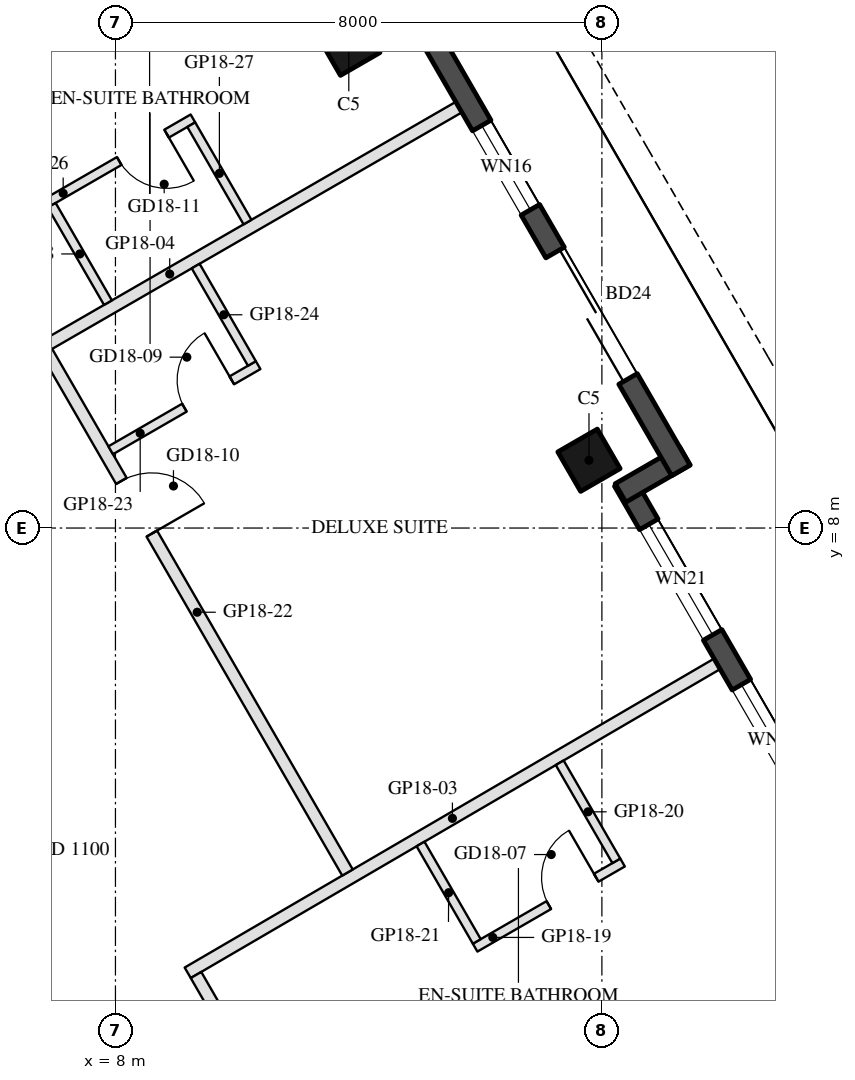
"""IFC4 building model, lengths in metres.
Left out: names, types, materials, properties, quantities, classifications, styles, units other than length and angle.
Written with IfcOpenShell. Run it as: python <this file> out.ifc"""

import sys

from ifc_helpers import new_model, si_unit, direction, frame, frame_2d, origin, origin_2d, place, context, subcontext, project, spatial, rectangle, hollow_rectangle, extrude, element, fill, save


model = new_model("IFC4")
c1 = context("Model", 3, precision=1e-05, world=origin(), true_north=direction((0.0, 1.0)))
c2 = subcontext(c1, "Body", "Model", "MODEL_VIEW")
j1 = project(units=[si_unit("LENGTHUNIT", "METRE"), si_unit("PLANEANGLEUNIT", "RADIAN")], contexts=[c1])
p1 = place(None, origin())
s1 = spatial("IfcSite", under=j1, at=p1, CompositionType="ELEMENT")
p2 = place(p1, origin())
s2 = spatial("IfcBuilding", under=s1, at=p2, CompositionType="ELEMENT")
p3 = place(p2, frame((0.0, 0.0, 191.0)))
s3 = spatial("IfcBuildingStorey", under=s2, at=p3, CompositionType="ELEMENT", Elevation=191.0)
for number, where, z_axis, x_axis in (
    (1, (15.788, 9.115, 0.0), (0.0, 0.0, 1.0), (-0.5, 0.866, 0.0)),
    (2, (11.838, 15.957, 0.0), (0.0, 0.0, 1.0), (-0.5, 0.866, 0.0)),
):
    element("IfcColumn", number, at=place(p3, frame(where, z_axis=z_axis, x_axis=x_axis)), inside=s3, PredefinedType="COLUMN", context=c2, shape_type="SweptSolid", body=[
        extrude(hollow_rectangle(XDim=0.75, YDim=0.75, WallThickness=0.035, at=origin_2d()), origin(), (0.0, 0.0, 1.0), 3.7),
    ])
p4 = place(p3, frame((19.729, 2.938, 0.0), z_axis=(0.0, 0.0, 1.0), x_axis=(-0.499976430342, 0.866039011305, 0.0)))
e3 = element("IfcWall", 3, at=p4, inside=s3, PredefinedType="SOLIDWALL", context=c2, shape_type="SweptSolid", body=[
    extrude(rectangle(XDim=6.74, YDim=0.35, at=frame_2d((3.37, 0.0))), origin(), (0.0, 0.0, 1.0), 3.55),
])
p5 = place(p4, frame((0.77, 0.0, 0.3)))
e4 = element("IfcOpeningElement", 4, at=p5, cuts=e3, PredefinedType="OPENING", context=c2, shape_type="SweptSolid", body=[
    extrude(rectangle(XDim=2.1, YDim=2.65, at=frame_2d((1.05, 1.325))), frame((0.0, 0.185, 0.0), z_axis=(0.0, -1.0, 0.0), x_axis=(1.0, 0.0, 0.0)), (0.0, 0.0, 1.0), 0.37),
])
p6 = place(p4, frame((3.815, 0.0, 0.3)))
e5 = element("IfcOpeningElement", 5, at=p6, cuts=e3, PredefinedType="OPENING", context=c2, shape_type="SweptSolid", body=[
    extrude(rectangle(XDim=2.1, YDim=2.65, at=frame_2d((1.05, 1.325))), frame((0.0, 0.185, 0.0), z_axis=(0.0, -1.0, 0.0), x_axis=(1.0, 0.0, 0.0)), (0.0, 0.0, 1.0), 0.37),
])
p7 = place(p3, frame((16.306, 8.577, 0.0), z_axis=(0.0, 0.0, 1.0), x_axis=(0.866092288191, 0.499884134912, 0.0)))
e6 = element("IfcWall", 6, at=p7, inside=s3, PredefinedType="SOLIDWALL", context=c2, shape_type="SweptSolid", body=[
    extrude(rectangle(XDim=1.22, YDim=0.35, at=frame_2d((0.61, 0.0))), origin(), (0.0, 0.0, 1.0), 3.55),
])
p8 = place(p3, frame((17.299, 8.948, 0.0), z_axis=(0.0, 0.0, 1.0), x_axis=(-0.500010041276, 0.866019606374, 0.0)))
e7 = element("IfcWall", 7, at=p8, inside=s3, PredefinedType="SOLIDWALL", context=c2, shape_type="SweptSolid", body=[
    extrude(rectangle(XDim=9.7, YDim=0.35, at=frame_2d((4.85, 0.0))), origin(), (0.0, 0.0, 1.0), 3.55),
])
p9 = place(p8, frame((1.737, 0.0, 0.0)))
e8 = element("IfcOpeningElement", 8, at=p9, cuts=e7, PredefinedType="OPENING", context=c2, shape_type="SweptSolid", body=[
    extrude(rectangle(XDim=2.4, YDim=2.4, at=frame_2d((1.2, 1.2))), frame((0.0, 0.185, 0.0), z_axis=(0.0, -1.0, 0.0), x_axis=(1.0, 0.0, 0.0)), (0.0, 0.0, 1.0), 0.37),
])
p10 = place(p8, frame((4.949, 0.0, 0.3)))
e9 = element("IfcOpeningElement", 9, at=p10, cuts=e7, PredefinedType="OPENING", context=c2, shape_type="SweptSolid", body=[
    extrude(rectangle(XDim=1.6, YDim=2.65, at=frame_2d((0.8, 1.325))), frame((0.0, 0.185, 0.0), z_axis=(0.0, -1.0, 0.0), x_axis=(1.0, 0.0, 0.0)), (0.0, 0.0, 1.0), 0.37),
])
p11 = place(p3, frame((17.895, 5.766, 0.0), z_axis=(0.0, 0.0, 1.0), x_axis=(-0.863697195261, -0.504011066246, 0.0)))
e10 = element("IfcWall", 10, at=p11, inside=s3, PredefinedType="PARTITIONING", context=c2, shape_type="SweptSolid", body=[
    extrude(rectangle(XDim=10.08, YDim=0.2, at=frame_2d((5.04, 0.0))), origin(), (0.0, 0.0, 1.0), 2.95),
])
p12 = place(p3, frame((13.647, 14.923, 0.0), z_axis=(0.0, 0.0, 1.0), x_axis=(-0.866027479907, -0.499996404033, 0.0)))
e11 = element("IfcWall", 11, at=p12, inside=s3, PredefinedType="PARTITIONING", context=c2, shape_type="SweptSolid", body=[
    extrude(rectangle(XDim=10.98, YDim=0.2, at=frame_2d((5.49, 0.0))), origin(), (0.0, 0.0, 1.0), 3.06),
])
p13 = place(p3, frame((9.325, 0.649, 0.0), z_axis=(0.0, 0.0, 1.0), x_axis=(0.500032331163, -0.866006736574, 0.0)))
e12 = element("IfcWall", 12, at=p13, inside=s3, PredefinedType="PARTITIONING", context=c2, shape_type="SweptSolid", body=[
    extrude(rectangle(XDim=5.888, YDim=0.2, at=frame_2d((2.944, 0.0))), origin(), (0.0, 0.0, 1.0), 2.95),
])
p14 = place(p13, frame((2.444, 0.0, 0.0)))
e13 = element("IfcOpeningElement", 13, at=p14, cuts=e12, PredefinedType="OPENING", context=c2, shape_type="SweptSolid", body=[
    extrude(rectangle(XDim=1.0, YDim=2.1, at=frame_2d((0.5, 1.05))), frame((0.0, 0.11, 0.0), z_axis=(0.0, -1.0, 0.0), x_axis=(1.0, 0.0, 0.0)), (0.0, 0.0, 1.0), 0.22),
])
p15 = place(p3, frame((13.915, 1.099, 0.0), z_axis=(0.0, 0.0, 1.0), x_axis=(0.866018616679, 0.500011755427, 0.0)))
e14 = element("IfcWall", 14, at=p15, inside=s3, PredefinedType="PARTITIONING", context=c2, shape_type="SweptSolid", body=[
    extrude(rectangle(XDim=2.8, YDim=0.15, at=frame_2d((1.4, 0.0))), origin(), (0.0, 0.0, 1.0), 3.55),
])
p16 = place(p15, frame((1.4, 0.0, 0.0)))
e15 = element("IfcOpeningElement", 15, at=p16, cuts=e14, PredefinedType="OPENING", context=c2, shape_type="SweptSolid", body=[
    extrude(rectangle(XDim=0.9, YDim=2.1, at=frame_2d((0.45, 1.05))), frame((0.0, 0.085, 0.0), z_axis=(0.0, -1.0, 0.0), x_axis=(1.0, 0.0, 0.0)), (0.0, 0.0, 1.0), 0.17),
])
p17 = place(p3, frame((16.237, 2.526, 0.0), z_axis=(0.0, 0.0, 1.0), x_axis=(-0.500043919151, 0.866000045566, 0.0)))
e16 = element("IfcWall", 16, at=p17, inside=s3, PredefinedType="PARTITIONING", context=c2, shape_type="SweptSolid", body=[
    extrude(rectangle(XDim=1.863, YDim=0.15, at=frame_2d((0.931, 0.0))), origin(), (0.0, 0.0, 1.0), 3.55),
])
p18 = place(p3, frame((13.942, 1.201, 0.0), z_axis=(0.0, 0.0, 1.0), x_axis=(-0.500026996568, 0.866009816748, 0.0)))
e17 = element("IfcWall", 17, at=p18, inside=s3, PredefinedType="PARTITIONING", context=c2, shape_type="SweptSolid", body=[
    extrude(rectangle(XDim=1.851, YDim=0.15, at=frame_2d((0.925, 0.0))), origin(), (0.0, 0.0, 1.0), 3.55),
])
p19 = place(p3, frame((6.873, 10.896, 0.0), z_axis=(0.0, 0.0, 1.0), x_axis=(0.499987518031, -0.866032610133, 0.0)))
e18 = element("IfcWall", 18, at=p19, inside=s3, PredefinedType="PARTITIONING", context=c2, shape_type="SweptSolid", body=[
    extrude(rectangle(XDim=9.886, YDim=0.2, at=frame_2d((4.943, 0.0))), origin(), (0.0, 0.0, 1.0), 2.95),
])
p20 = place(p19, frame((2.45, 0.0, 0.0)))
e19 = element("IfcOpeningElement", 19, at=p20, cuts=e18, PredefinedType="OPENING", context=c2, shape_type="SweptSolid", body=[
    extrude(rectangle(XDim=1.0, YDim=2.1, at=frame_2d((0.5, 1.05))), frame((0.0, 0.11, 0.0), z_axis=(0.0, -1.0, 0.0), x_axis=(1.0, 0.0, 0.0)), (0.0, 0.0, 1.0), 0.22),
])
p21 = place(p3, frame((7.922, 9.279, 0.0), z_axis=(0.0, 0.0, 1.0), x_axis=(0.865996816683, 0.500049511043, 0.0)))
e20 = element("IfcWall", 20, at=p21, inside=s3, PredefinedType="PARTITIONING", context=c2, shape_type="SweptSolid", body=[
    extrude(rectangle(XDim=2.8, YDim=0.15, at=frame_2d((1.4, 0.0))), origin(), (0.0, 0.0, 1.0), 2.95),
])
p22 = place(p21, frame((1.4, 0.0, 0.0)))
e21 = element("IfcOpeningElement", 21, at=p22, cuts=e20, PredefinedType="OPENING", context=c2, shape_type="SweptSolid", body=[
    extrude(rectangle(XDim=0.9, YDim=2.1, at=frame_2d((0.45, 1.05))), frame((0.0, 0.085, 0.0), z_axis=(0.0, -1.0, 0.0), x_axis=(1.0, 0.0, 0.0)), (0.0, 0.0, 1.0), 0.17),
])
p23 = place(p3, frame((10.244, 10.707, 0.0), z_axis=(0.0, 0.0, 1.0), x_axis=(-0.500042316284, 0.866000971088, 0.0)))
e22 = element("IfcWall", 22, at=p23, inside=s3, PredefinedType="PARTITIONING", context=c2, shape_type="SweptSolid", body=[
    extrude(rectangle(XDim=1.85, YDim=0.15, at=frame_2d((0.925, 0.0))), origin(), (0.0, 0.0, 1.0), 3.55),
])
p24 = place(p3, frame((9.274, 14.737, 0.0), z_axis=(0.0, 0.0, 1.0), x_axis=(-0.866018616679, -0.500011755427, 0.0)))
e23 = element("IfcWall", 23, at=p24, inside=s3, PredefinedType="PARTITIONING", context=c2, shape_type="SweptSolid", body=[
    extrude(rectangle(XDim=2.8, YDim=0.15, at=frame_2d((1.4, 0.0))), origin(), (0.0, 0.0, 1.0), 3.55),
])
p25 = place(p24, frame((0.5, 0.0, 0.0)))
e24 = element("IfcOpeningElement", 24, at=p25, cuts=e23, PredefinedType="OPENING", context=c2, shape_type="SweptSolid", body=[
    extrude(rectangle(XDim=0.9, YDim=2.1, at=frame_2d((0.45, 1.05))), frame((0.0, 0.085, 0.0), z_axis=(0.0, -1.0, 0.0), x_axis=(1.0, 0.0, 0.0)), (0.0, 0.0, 1.0), 0.17),
])
p26 = place(p3, frame((10.172, 13.032, 0.0), z_axis=(0.0, 0.0, 1.0), x_axis=(-0.500042316284, 0.866000971088, 0.0)))
e25 = element("IfcWall", 25, at=p26, inside=s3, PredefinedType="PARTITIONING", context=c2, shape_type="SweptSolid", body=[
    extrude(rectangle(XDim=1.85, YDim=0.15, at=frame_2d((0.925, 0.0))), origin(), (0.0, 0.0, 1.0), 2.95),
])
p27 = place(p3, frame((7.877, 11.707, 0.0), z_axis=(0.0, 0.0, 1.0), x_axis=(-0.499985172903, 0.866033964044, 0.0)))
e26 = element("IfcWall", 26, at=p27, inside=s3, PredefinedType="PARTITIONING", context=c2, shape_type="SweptSolid", body=[
    extrude(rectangle(XDim=1.85, YDim=0.15, at=frame_2d((0.925, 0.0))), origin(), (0.0, 0.0, 1.0), 2.95),
])
p28 = place(p5, origin())
e27 = element("IfcWindow", 27, at=p28, inside=s3, PartitioningType="SINGLE_PANEL", PredefinedType="WINDOW", context=c2, shape_type="SweptSolid", body=[
    extrude(rectangle(XDim=2.1, YDim=2.65, at=frame_2d((1.05, 1.325))), frame((0.0, 0.03, 0.0), z_axis=(0.0, -1.0, 0.0), x_axis=(1.0, 0.0, 0.0)), (0.0, 0.0, 1.0), 0.06),
])
fill(e4, e27)
p29 = place(p6, origin())
e28 = element("IfcWindow", 28, at=p29, inside=s3, PartitioningType="SINGLE_PANEL", PredefinedType="WINDOW", context=c2, shape_type="SweptSolid", body=[
    extrude(rectangle(XDim=2.1, YDim=2.65, at=frame_2d((1.05, 1.325))), frame((0.0, 0.03, 0.0), z_axis=(0.0, -1.0, 0.0), x_axis=(1.0, 0.0, 0.0)), (0.0, 0.0, 1.0), 0.06),
])
fill(e5, e28)
p30 = place(p9, frame((2.4, 0.0, 0.0), z_axis=(0.0, 0.0, 1.0), x_axis=(-1.0, 0.0, 0.0)))
e29 = element("IfcDoor", 29, at=p30, inside=s3, OperationType="SLIDING_TO_LEFT", PredefinedType="DOOR", context=c2, shape_type="SweptSolid", body=[
    extrude(rectangle(XDim=2.4, YDim=2.4, at=frame_2d((1.2, 1.2))), frame((0.0, 0.025, 0.0), z_axis=(0.0, -1.0, 0.0), x_axis=(1.0, 0.0, 0.0)), (0.0, 0.0, 1.0), 0.05),
])
fill(e8, e29)
p31 = place(p10, origin())
e30 = element("IfcWindow", 30, at=p31, inside=s3, PartitioningType="SINGLE_PANEL", PredefinedType="WINDOW", context=c2, shape_type="SweptSolid", body=[
    extrude(rectangle(XDim=1.6, YDim=2.65, at=frame_2d((0.8, 1.325))), frame((0.0, 0.03, 0.0), z_axis=(0.0, -1.0, 0.0), x_axis=(1.0, 0.0, 0.0)), (0.0, 0.0, 1.0), 0.06),
])
fill(e9, e30)
p32 = place(p16, origin())
e31 = element("IfcDoor", 31, at=p32, inside=s3, OperationType="SINGLE_SWING_RIGHT", PredefinedType="DOOR", context=c2, shape_type="SweptSolid", body=[
    extrude(rectangle(XDim=0.9, YDim=2.1, at=frame_2d((0.45, 1.05))), frame((0.0, 0.025, 0.0), z_axis=(0.0, -1.0, 0.0), x_axis=(1.0, 0.0, 0.0)), (0.0, 0.0, 1.0), 0.05),
])
fill(e15, e31)
p33 = place(p22, origin())
e32 = element("IfcDoor", 32, at=p33, inside=s3, OperationType="SINGLE_SWING_RIGHT", PredefinedType="DOOR", context=c2, shape_type="SweptSolid", body=[
    extrude(rectangle(XDim=0.9, YDim=2.1, at=frame_2d((0.45, 1.05))), frame((0.0, 0.025, 0.0), z_axis=(0.0, -1.0, 0.0), x_axis=(1.0, 0.0, 0.0)), (0.0, 0.0, 1.0), 0.05),
])
fill(e21, e32)
p34 = place(p20, origin())
e33 = element("IfcDoor", 33, at=p34, inside=s3, OperationType="SINGLE_SWING_RIGHT", PredefinedType="DOOR", context=c2, shape_type="SweptSolid", body=[
    extrude(rectangle(XDim=1.0, YDim=2.1, at=frame_2d((0.5, 1.05))), frame((0.0, 0.025, 0.0), z_axis=(0.0, -1.0, 0.0), x_axis=(1.0, 0.0, 0.0)), (0.0, 0.0, 1.0), 0.05),
])
fill(e19, e33)
p35 = place(p25, origin())
e34 = element("IfcDoor", 34, at=p35, inside=s3, OperationType="SINGLE_SWING_LEFT", PredefinedType="DOOR", context=c2, shape_type="SweptSolid", body=[
    extrude(rectangle(XDim=0.9, YDim=2.1, at=frame_2d((0.45, 1.05))), frame((0.0, 0.025, 0.0), z_axis=(0.0, -1.0, 0.0), x_axis=(1.0, 0.0, 0.0)), (0.0, 0.0, 1.0), 0.05),
])
fill(e24, e34)
save(model, sys.argv[1])
